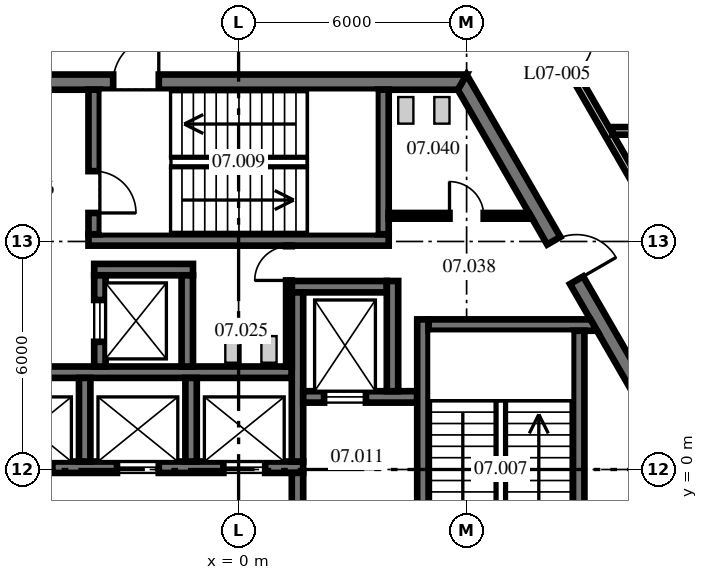
"""IFC4 building model, lengths in metres.
Left out: names, types, materials, properties, quantities, classifications, styles, units other than length and angle.
Written with IfcOpenShell. Run it as: python <this file> out.ifc"""

import sys

from ifc_helpers import new_model, si_unit, direction, frame, frame_2d, origin, place, context, subcontext, project, spatial, polyline, rectangle, outline, extrude, source, transform, mapped, element, fill, save


model = new_model("IFC4")
c1 = context("Model", 3, precision=1e-05, world=origin(), true_north=direction((0.0, 1.0)))
c2 = subcontext(c1, "Body", "Model", "MODEL_VIEW")
j1 = project(units=[si_unit("LENGTHUNIT", "METRE"), si_unit("PLANEANGLEUNIT", "RADIAN")], contexts=[c1])
p1 = place(None, origin())
s1 = spatial("IfcSite", under=j1, at=p1, CompositionType="ELEMENT")
p2 = place(p1, origin())
s2 = spatial("IfcBuilding", under=s1, at=p2, CompositionType="ELEMENT")
p3 = place(p2, frame((0.0, 0.0, 33.2)))
s3 = spatial("IfcBuildingStorey", under=s2, at=p3, CompositionType="ELEMENT", Elevation=33.2)
m1 = source(origin(), c2, "Body", "SweptSolid", [
    extrude(outline(polyline([(-0.115, -0.2), (11.885, -0.2), (11.654, 0.2), (0.115, 0.2), (-0.115, -0.2)])), origin(), (0.0, 0.0, 1.0), 4.1),
])
p4 = place(p3, frame((11.769, 0.0, 0.0), z_axis=(0.0, 0.0, 1.0), x_axis=(-0.499996592174, 0.866027371285, 0.0)))
e1 = element("IfcWall", 1, at=p4, inside=s3, PredefinedType="SHEAR", context=c2, shape_type="MappedRepresentation", body=[
    mapped(m1, transform((0.0, 0.0, 0.0), scale=1.0)),
])
p5 = place(p4, frame((5.75, 0.0, 0.0)))
e2 = element("IfcOpeningElement", 2, at=p5, cuts=e1, PredefinedType="OPENING", context=c2, shape_type="SweptSolid", body=[
    extrude(rectangle(XDim=1.2, YDim=2.1, at=frame_2d((0.6, 1.05))), frame((0.0, 0.21, 0.0), z_axis=(0.0, -1.0, 0.0), x_axis=(1.0, 0.0, 0.0)), (0.0, 0.0, 1.0), 0.42),
])
p6 = place(p3, frame((5.885, 10.192, 0.0), z_axis=(0.0, 0.0, 1.0), x_axis=(-1.0, 0.0, 0.0)))
e3 = element("IfcWall", 3, at=p6, inside=s3, PredefinedType="SHEAR", context=c2, shape_type="MappedRepresentation", body=[
    mapped(m1, transform((0.0, 0.0, 0.0), scale=1.0)),
])
p7 = place(p6, frame((7.985, 0.0, 0.0)))
e4 = element("IfcOpeningElement", 4, at=p7, cuts=e3, PredefinedType="OPENING", context=c2, shape_type="SweptSolid", body=[
    extrude(rectangle(XDim=1.2, YDim=2.1, at=frame_2d((0.6, 1.05))), frame((0.0, 0.21, 0.0), z_axis=(0.0, -1.0, 0.0), x_axis=(1.0, 0.0, 0.0)), (0.0, 0.0, 1.0), 0.42),
])
p8 = place(p3, frame((5.885, -10.192, 0.0), z_axis=(0.0, 0.0, 1.0), x_axis=(0.499996592174, 0.866027371285, 0.0)))
e5 = element("IfcWall", 5, at=p8, inside=s3, PredefinedType="SHEAR", context=c2, shape_type="MappedRepresentation", body=[
    mapped(m1, transform((0.0, 0.0, 0.0), scale=1.0)),
])
p9 = place(p8, frame((3.665, 0.0, 0.0)))
e6 = element("IfcOpeningElement", 6, at=p9, cuts=e5, PredefinedType="OPENING", context=c2, shape_type="SweptSolid", body=[
    extrude(rectangle(XDim=1.2, YDim=2.1, at=frame_2d((0.6, 1.05))), frame((0.0, 0.21, 0.0), z_axis=(0.0, -1.0, 0.0), x_axis=(1.0, 0.0, 0.0)), (0.0, 0.0, 1.0), 0.42),
])
m2 = source(origin(), c2, "Body", "SweptSolid", [
    extrude(rectangle(XDim=11.5, YDim=0.3, at=frame_2d((5.75, 0.0))), origin(), (0.0, 0.0, 1.0), 4.1),
])
p10 = place(p3, frame((-9.8, 0.06, 0.0), z_axis=(0.0, 0.0, 1.0), x_axis=(1.0, 0.0, 0.0)))
e7 = element("IfcWall", 7, at=p10, inside=s3, PredefinedType="SHEAR", context=c2, shape_type="MappedRepresentation", body=[
    mapped(m2, transform((0.0, 0.0, 0.0), scale=1.0)),
])
p11 = place(p10, frame((1.0, 0.0, 0.0)))
e8 = element("IfcOpeningElement", 8, at=p11, cuts=e7, PredefinedType="OPENING", context=c2, shape_type="SweptSolid", body=[
    extrude(rectangle(XDim=1.1, YDim=2.1, at=frame_2d((0.55, 1.05))), frame((0.0, 0.16, 0.0), z_axis=(0.0, -1.0, 0.0), x_axis=(1.0, 0.0, 0.0)), (0.0, 0.0, 1.0), 0.32),
])
p12 = place(p10, frame((3.8, 0.0, 0.0)))
e9 = element("IfcOpeningElement", 9, at=p12, cuts=e7, PredefinedType="OPENING", context=c2, shape_type="SweptSolid", body=[
    extrude(rectangle(XDim=1.1, YDim=2.1, at=frame_2d((0.55, 1.05))), frame((0.0, 0.16, 0.0), z_axis=(0.0, -1.0, 0.0), x_axis=(1.0, 0.0, 0.0)), (0.0, 0.0, 1.0), 0.32),
])
p13 = place(p10, frame((6.6, 0.0, 0.0)))
e10 = element("IfcOpeningElement", 10, at=p13, cuts=e7, PredefinedType="OPENING", context=c2, shape_type="SweptSolid", body=[
    extrude(rectangle(XDim=1.1, YDim=2.1, at=frame_2d((0.55, 1.05))), frame((0.0, 0.16, 0.0), z_axis=(0.0, -1.0, 0.0), x_axis=(1.0, 0.0, 0.0)), (0.0, 0.0, 1.0), 0.32),
])
p14 = place(p10, frame((9.4, 0.0, 0.0)))
e11 = element("IfcOpeningElement", 11, at=p14, cuts=e7, PredefinedType="OPENING", context=c2, shape_type="SweptSolid", body=[
    extrude(rectangle(XDim=1.1, YDim=2.1, at=frame_2d((0.55, 1.05))), frame((0.0, 0.16, 0.0), z_axis=(0.0, -1.0, 0.0), x_axis=(1.0, 0.0, 0.0)), (0.0, 0.0, 1.0), 0.32),
])
m3 = source(origin(), c2, "Body", "SweptSolid", [
    extrude(outline(polyline([(11.2, -0.15), (-0.349, -0.15), (-0.176, 0.15), (11.2, 0.15), (11.2, -0.15)])), origin(), (0.0, 0.0, 1.0), 4.1),
])
p15 = place(p3, frame((-9.8, 2.56, 0.0), z_axis=(0.0, 0.0, 1.0), x_axis=(1.0, 0.0, 0.0)))
e12 = element("IfcWall", 12, at=p15, inside=s3, PredefinedType="SHEAR", context=c2, shape_type="MappedRepresentation", body=[
    mapped(m3, transform((0.0, 0.0, 0.0), scale=1.0)),
])
m4 = source(origin(), c2, "Body", "SweptSolid", [
    extrude(rectangle(XDim=2.5, YDim=0.3, at=frame_2d((1.25, 0.0))), origin(), (0.0, 0.0, 1.0), 4.1),
])
p16 = place(p3, frame((1.4, 4.81, 0.0), z_axis=(0.0, 0.0, 1.0), x_axis=(1.0, 0.0, 0.0)))
e13 = element("IfcWall", 13, at=p16, inside=s3, PredefinedType="SHEAR", context=c2, shape_type="MappedRepresentation", body=[
    mapped(m4, transform((0.0, 0.0, 0.0), scale=1.0)),
])
m5 = source(origin(), c2, "Body", "SweptSolid", [
    extrude(rectangle(XDim=4.45, YDim=0.3, at=frame_2d((2.225, 0.0))), origin(), (0.0, 0.0, 1.0), 4.1),
])
p17 = place(p3, frame((1.55, 0.21, 0.0), z_axis=(0.0, 0.0, 1.0), x_axis=(0.0, 1.0, 0.0)))
e14 = element("IfcWall", 14, at=p17, inside=s3, PredefinedType="SHEAR", context=c2, shape_type="MappedRepresentation", body=[
    mapped(m5, transform((0.0, 0.0, 0.0), scale=1.0)),
])
m6 = source(origin(), c2, "Body", "SweptSolid", [
    extrude(rectangle(XDim=3.0, YDim=0.3, at=frame_2d((1.5, 0.0))), origin(), (0.0, 0.0, 1.0), 4.1),
])
p18 = place(p3, frame((1.7, 1.91, 0.0), z_axis=(0.0, 0.0, 1.0), x_axis=(1.0, 0.0, 0.0)))
e15 = element("IfcWall", 15, at=p18, inside=s3, PredefinedType="SHEAR", context=c2, shape_type="MappedRepresentation", body=[
    mapped(m6, transform((0.0, 0.0, 0.0), scale=1.0)),
])
p19 = place(p18, frame((0.55, 0.0, 0.0)))
e16 = element("IfcOpeningElement", 16, at=p19, cuts=e15, PredefinedType="OPENING", context=c2, shape_type="SweptSolid", body=[
    extrude(rectangle(XDim=1.1, YDim=2.1, at=frame_2d((0.55, 1.05))), frame((0.0, 0.16, 0.0), z_axis=(0.0, -1.0, 0.0), x_axis=(1.0, 0.0, 0.0)), (0.0, 0.0, 1.0), 0.32),
])
m7 = source(origin(), c2, "Body", "SweptSolid", [
    extrude(rectangle(XDim=2.9, YDim=0.3, at=frame_2d((1.45, 0.0))), origin(), (0.0, 0.0, 1.0), 4.1),
])
p20 = place(p3, frame((4.05, 2.06, 0.0), z_axis=(0.0, 0.0, 1.0), x_axis=(0.0, 1.0, 0.0)))
e17 = element("IfcWall", 17, at=p20, inside=s3, PredefinedType="SHEAR", context=c2, shape_type="MappedRepresentation", body=[
    mapped(m7, transform((0.0, 0.0, 0.0), scale=1.0)),
])
p21 = place(p3, frame((1.55, -3.09, 0.0), z_axis=(0.0, 0.0, 1.0), x_axis=(0.0, 1.0, 0.0)))
e18 = element("IfcWall", 18, at=p21, inside=s3, PredefinedType="SHEAR", context=c2, shape_type="MappedRepresentation", body=[
    mapped(m6, transform((0.0, 0.0, 0.0), scale=1.0)),
])
p22 = place(p21, frame((0.9, 0.0, 0.0)))
e19 = element("IfcOpeningElement", 19, at=p22, cuts=e18, PredefinedType="OPENING", context=c2, shape_type="SweptSolid", body=[
    extrude(rectangle(XDim=1.2, YDim=2.1, at=frame_2d((0.6, 1.05))), frame((0.0, 0.16, 0.0), z_axis=(0.0, -1.0, 0.0), x_axis=(1.0, 0.0, 0.0)), (0.0, 0.0, 1.0), 0.32),
])
m8 = source(origin(), c2, "Body", "SweptSolid", [
    extrude(outline(polyline([(-0.15, -0.15), (9.99, -0.15), (9.99, 0.15), (0.15, 0.15), (-0.15, -0.15)])), origin(), (0.0, 0.0, 1.0), 4.1),
])
p23 = place(p3, frame((4.85, -6.04, 0.0), z_axis=(0.0, 0.0, 1.0), x_axis=(0.0, 1.0, 0.0)))
e20 = element("IfcWall", 20, at=p23, inside=s3, PredefinedType="SHEAR", context=c2, shape_type="MappedRepresentation", body=[
    mapped(m8, transform((0.0, 0.0, 0.0), scale=1.0)),
])
p24 = place(p23, frame((3.19, 0.0, 0.0)))
e21 = element("IfcOpeningElement", 21, at=p24, cuts=e20, PredefinedType="OPENING", context=c2, shape_type="SweptSolid", body=[
    extrude(rectangle(XDim=1.1, YDim=2.1, at=frame_2d((0.55, 1.05))), frame((0.0, 0.16, 0.0), z_axis=(0.0, -1.0, 0.0), x_axis=(1.0, 0.0, 0.0)), (0.0, 0.0, 1.0), 0.32),
])
m9 = source(origin(), c2, "Body", "SweptSolid", [
    extrude(outline(polyline([(0.0, -0.15), (0.0, 0.15), (4.26, 0.15), (4.433, -0.15), (0.0, -0.15)])), origin(), (0.0, 0.0, 1.0), 4.1),
])
p25 = place(p3, frame((5.0, 3.8, 0.0), z_axis=(0.0, 0.0, 1.0), x_axis=(1.0, 0.0, 0.0)))
e22 = element("IfcWall", 22, at=p25, inside=s3, PredefinedType="SHEAR", context=c2, shape_type="MappedRepresentation", body=[
    mapped(m9, transform((0.0, 0.0, 0.0), scale=1.0)),
])
m10 = source(origin(), c2, "Body", "SweptSolid", [
    extrude(rectangle(XDim=7.3, YDim=0.3, at=frame_2d((3.65, 0.0))), origin(), (0.0, 0.0, 1.0), 4.1),
])
p26 = place(p3, frame((8.95, -3.65, 0.0), z_axis=(0.0, 0.0, 1.0), x_axis=(0.0, 1.0, 0.0)))
e23 = element("IfcWall", 23, at=p26, inside=s3, PredefinedType="SHEAR", context=c2, shape_type="MappedRepresentation", body=[
    mapped(m10, transform((0.0, 0.0, 0.0), scale=1.0)),
])
m11 = source(origin(), c2, "Body", "SweptSolid", [
    extrude(rectangle(XDim=7.9, YDim=0.3, at=frame_2d((3.95, 0.0))), origin(), (0.0, 0.0, 1.0), 4.1),
])
p27 = place(p3, frame((-3.95, 6.04, 0.0), z_axis=(0.0, 0.0, 1.0), x_axis=(1.0, 0.0, 0.0)))
e24 = element("IfcWall", 24, at=p27, inside=s3, PredefinedType="SHEAR", context=c2, shape_type="MappedRepresentation", body=[
    mapped(m11, transform((0.0, 0.0, 0.0), scale=1.0)),
])
m12 = source(origin(), c2, "Body", "SweptSolid", [
    extrude(outline(polyline([(0.0, -0.15), (0.0, 0.15), (3.804, 0.15), (3.804, -0.15), (0.0, -0.15)])), origin(), (0.0, 0.0, 1.0), 4.1),
])
p28 = place(p3, frame((-3.8, 6.19, 0.0), z_axis=(0.0, 0.0, 1.0), x_axis=(0.0, 1.0, 0.0)))
e25 = element("IfcWall", 25, at=p28, inside=s3, PredefinedType="SHEAR", context=c2, shape_type="MappedRepresentation", body=[
    mapped(m12, transform((0.0, 0.0, 0.0), scale=1.0)),
])
p29 = place(p28, frame((0.56, 0.0, 0.0)))
e26 = element("IfcOpeningElement", 26, at=p29, cuts=e25, PredefinedType="OPENING", context=c2, shape_type="SweptSolid", body=[
    extrude(rectangle(XDim=1.1, YDim=2.1, at=frame_2d((0.55, 1.05))), frame((0.0, 0.16, 0.0), z_axis=(0.0, -1.0, 0.0), x_axis=(1.0, 0.0, 0.0)), (0.0, 0.0, 1.0), 0.32),
])
p30 = place(p3, frame((3.8, 6.19, 0.0), z_axis=(0.0, 0.0, 1.0), x_axis=(0.0, 1.0, 0.0)))
e27 = element("IfcWall", 27, at=p30, inside=s3, PredefinedType="SHEAR", context=c2, shape_type="MappedRepresentation", body=[
    mapped(m12, transform((0.0, 0.0, 0.0), scale=1.0)),
])
m13 = source(origin(), c2, "Body", "SweptSolid", [
    extrude(rectangle(XDim=2.6, YDim=0.3, at=frame_2d((1.3, 0.0))), origin(), (0.0, 0.0, 1.0), 4.1),
])
p31 = place(p3, frame((-3.8, 5.26, 0.0), z_axis=(0.0, 0.0, 1.0), x_axis=(1.0, 0.0, 0.0)))
e28 = element("IfcWall", 28, at=p31, inside=s3, PredefinedType="SHEAR", context=c2, shape_type="MappedRepresentation", body=[
    mapped(m13, transform((0.0, 0.0, 0.0), scale=1.0)),
])
m14 = source(origin(), c2, "Body", "SweptSolid", [
    extrude(rectangle(XDim=2.4, YDim=0.3, at=frame_2d((1.2, 0.0))), origin(), (0.0, 0.0, 1.0), 4.1),
])
p32 = place(p3, frame((-3.65, 2.71, 0.0), z_axis=(0.0, 0.0, 1.0), x_axis=(0.0, 1.0, 0.0)))
e29 = element("IfcWall", 29, at=p32, inside=s3, PredefinedType="SHEAR", context=c2, shape_type="MappedRepresentation", body=[
    mapped(m14, transform((0.0, 0.0, 0.0), scale=1.0)),
])
p33 = place(p32, frame((0.65, 0.0, 0.0)))
e30 = element("IfcOpeningElement", 30, at=p33, cuts=e29, PredefinedType="OPENING", context=c2, shape_type="SweptSolid", body=[
    extrude(rectangle(XDim=1.1, YDim=2.1, at=frame_2d((0.55, 1.05))), frame((0.0, 0.16, 0.0), z_axis=(0.0, -1.0, 0.0), x_axis=(1.0, 0.0, 0.0)), (0.0, 0.0, 1.0), 0.32),
])
p34 = place(p3, frame((-1.35, 2.71, 0.0), z_axis=(0.0, 0.0, 1.0), x_axis=(0.0, 1.0, 0.0)))
e31 = element("IfcWall", 31, at=p34, inside=s3, PredefinedType="SHEAR", context=c2, shape_type="MappedRepresentation", body=[
    mapped(m14, transform((0.0, 0.0, 0.0), scale=1.0)),
])
m15 = source(origin(), c2, "Body", "SweptSolid", [
    extrude(rectangle(XDim=3.18, YDim=0.15, at=frame_2d((1.59, 0.0))), origin(), (0.0, 0.0, 1.0), 4.1),
])
p35 = place(p3, frame((1.325, 2.71, 0.0), z_axis=(0.0, 0.0, 1.0), x_axis=(0.0, 1.0, 0.0)))
e32 = element("IfcWall", 32, at=p35, inside=s3, PredefinedType="PARTITIONING", context=c2, shape_type="MappedRepresentation", body=[
    mapped(m15, transform((0.0, 0.0, 0.0), scale=1.0)),
])
p36 = place(p35, frame((2.265, 0.0, 0.0)))
e33 = element("IfcOpeningElement", 33, at=p36, cuts=e32, PredefinedType="OPENING", context=c2, shape_type="SweptSolid", body=[
    extrude(rectangle(XDim=0.9, YDim=2.1, at=frame_2d((0.45, 1.05))), frame((0.0, 0.085, 0.0), z_axis=(0.0, -1.0, 0.0), x_axis=(1.0, 0.0, 0.0)), (0.0, 0.0, 1.0), 0.17),
])
m16 = source(origin(), c2, "Body", "SweptSolid", [
    extrude(outline(polyline([(0.0, -0.075), (0.0, 0.075), (3.693, 0.075), (3.78, -0.075), (0.0, -0.075)])), origin(), (0.0, 0.0, 1.0), 4.1),
])
p37 = place(p3, frame((3.95, 6.675, 0.0), z_axis=(0.0, 0.0, 1.0), x_axis=(1.0, 0.0, 0.0)))
e34 = element("IfcWall", 34, at=p37, inside=s3, PredefinedType="PARTITIONING", context=c2, shape_type="MappedRepresentation", body=[
    mapped(m16, transform((0.0, 0.0, 0.0), scale=1.0)),
])
p38 = place(p37, frame((1.6, 0.0, 0.0)))
e35 = element("IfcOpeningElement", 35, at=p38, cuts=e34, PredefinedType="OPENING", context=c2, shape_type="SweptSolid", body=[
    extrude(rectangle(XDim=0.9, YDim=2.1, at=frame_2d((0.45, 1.05))), frame((0.0, 0.085, 0.0), z_axis=(0.0, -1.0, 0.0), x_axis=(1.0, 0.0, 0.0)), (0.0, 0.0, 1.0), 0.17),
])
m17 = source(origin(), c2, "Body", "SweptSolid", [
    extrude(rectangle(XDim=2.2, YDim=0.3, at=frame_2d((1.1, 0.0))), origin(), (0.0, 0.0, 1.0), 4.1),
])
for number, where, z_axis, x_axis in (
    (36, (-4.05, 0.21, 0.0), (0.0, 0.0, 1.0), (0.0, 1.0, 0.0)),
    (37, (-1.25, 0.21, 0.0), (0.0, 0.0, 1.0), (0.0, 1.0, 0.0)),
):
    element("IfcWall", number, at=place(p3, frame(where, z_axis=z_axis, x_axis=x_axis)), inside=s3, PredefinedType="SHEAR", context=c2, shape_type="MappedRepresentation", body=[
        mapped(m17, transform((0.0, 0.0, 0.0), scale=1.0)),
    ])
m18 = source(origin(), c2, "Body", "SweptSolid", [
    extrude(rectangle(XDim=14.759, YDim=0.2, at=frame_2d((7.379, 0.0))), origin(), (0.0, 0.0, 1.0), 4.1),
])
p39 = place(p3, frame((7.449, 12.782, 0.0), z_axis=(0.0, 0.0, 1.0), x_axis=(0.500005012202, -0.866022509969, 0.0)))
e38 = element("IfcWall", 38, at=p39, inside=s3, PredefinedType="PARTITIONING", context=c2, shape_type="MappedRepresentation", body=[
    mapped(m18, transform((0.0, 0.0, 0.0), scale=1.0)),
])
p40 = place(p39, frame((9.109, 0.0, 0.0)))
e39 = element("IfcOpeningElement", 39, at=p40, cuts=e38, PredefinedType="OPENING", context=c2, shape_type="SweptSolid", body=[
    extrude(rectangle(XDim=1.0, YDim=2.1, at=frame_2d((0.5, 1.05))), frame((0.0, 0.11, 0.0), z_axis=(0.0, -1.0, 0.0), x_axis=(1.0, 0.0, 0.0)), (0.0, 0.0, 1.0), 0.22),
])
p41 = place(p39, frame((1.721, 0.0, 0.0)))
e40 = element("IfcOpeningElement", 40, at=p41, cuts=e38, PredefinedType="OPENING", context=c2, shape_type="SweptSolid", body=[
    extrude(rectangle(XDim=1.0, YDim=2.1, at=frame_2d((0.5, 1.05))), frame((0.0, 0.11, 0.0), z_axis=(0.0, -1.0, 0.0), x_axis=(1.0, 0.0, 0.0)), (0.0, 0.0, 1.0), 0.22),
])
m19 = source(origin(), c2, "Body", "SweptSolid", [
    extrude(rectangle(XDim=11.652, YDim=0.2, at=frame_2d((5.826, 0.0))), origin(), (0.0, 0.0, 1.0), 3.343),
])
p42 = place(p3, frame((9.835, 8.91, 0.0), z_axis=(0.0, 0.0, 1.0), x_axis=(1.0, 0.0, 0.0)))
e41 = element("IfcWall", 41, at=p42, inside=s3, PredefinedType="PARTITIONING", context=c2, shape_type="MappedRepresentation", body=[
    mapped(m19, transform((0.0, 0.0, 0.0), scale=1.0)),
])
p43 = place(p7, frame((1.2, 0.0, 0.0), z_axis=(0.0, 0.0, 1.0), x_axis=(-1.0, 0.0, 0.0)))
e42 = element("IfcDoor", 42, at=p43, inside=s3, OperationType="SINGLE_SWING_RIGHT", PredefinedType="DOOR", context=c2, shape_type="SweptSolid", body=[
    extrude(rectangle(XDim=1.2, YDim=2.1, at=frame_2d((0.6, 1.05))), frame((0.0, 0.025, 0.0), z_axis=(0.0, -1.0, 0.0), x_axis=(1.0, 0.0, 0.0)), (0.0, 0.0, 1.0), 0.05),
])
fill(e4, e42)
p44 = place(p5, frame((1.2, 0.0, 0.0), z_axis=(0.0, 0.0, 1.0), x_axis=(-1.0, 0.0, 0.0)))
e43 = element("IfcDoor", 43, at=p44, inside=s3, OperationType="SINGLE_SWING_RIGHT", PredefinedType="DOOR", context=c2, shape_type="SweptSolid", body=[
    extrude(rectangle(XDim=1.2, YDim=2.1, at=frame_2d((0.6, 1.05))), frame((0.0, 0.025, 0.0), z_axis=(0.0, -1.0, 0.0), x_axis=(1.0, 0.0, 0.0)), (0.0, 0.0, 1.0), 0.05),
])
fill(e2, e43)
p45 = place(p29, frame((1.1, 0.0, 0.0), z_axis=(0.0, 0.0, 1.0), x_axis=(-1.0, 0.0, 0.0)))
e44 = element("IfcDoor", 44, at=p45, inside=s3, OperationType="SINGLE_SWING_RIGHT", PredefinedType="DOOR", context=c2, shape_type="SweptSolid", body=[
    extrude(rectangle(XDim=1.1, YDim=2.1, at=frame_2d((0.55, 1.05))), frame((0.0, 0.025, 0.0), z_axis=(0.0, -1.0, 0.0), x_axis=(1.0, 0.0, 0.0)), (0.0, 0.0, 1.0), 0.05),
])
fill(e26, e44)
p46 = place(p36, origin())
e45 = element("IfcDoor", 45, at=p46, inside=s3, OperationType="SINGLE_SWING_LEFT", PredefinedType="DOOR", context=c2, shape_type="SweptSolid", body=[
    extrude(rectangle(XDim=0.9, YDim=2.1, at=frame_2d((0.45, 1.05))), frame((0.0, 0.025, 0.0), z_axis=(0.0, -1.0, 0.0), x_axis=(1.0, 0.0, 0.0)), (0.0, 0.0, 1.0), 0.05),
])
fill(e33, e45)
p47 = place(p38, origin())
e46 = element("IfcDoor", 46, at=p47, inside=s3, OperationType="SINGLE_SWING_LEFT", PredefinedType="DOOR", context=c2, shape_type="SweptSolid", body=[
    extrude(rectangle(XDim=0.9, YDim=2.1, at=frame_2d((0.45, 1.05))), frame((0.0, 0.025, 0.0), z_axis=(0.0, -1.0, 0.0), x_axis=(1.0, 0.0, 0.0)), (0.0, 0.0, 1.0), 0.05),
])
fill(e35, e46)
p48 = place(p13, origin())
e47 = element("IfcDoor", 47, at=p48, inside=s3, OperationType="DOUBLE_DOOR_SLIDING", PredefinedType="DOOR", context=c2, shape_type="SweptSolid", body=[
    extrude(rectangle(XDim=1.1, YDim=2.1, at=frame_2d((0.55, 1.05))), frame((0.0, 0.025, 0.0), z_axis=(0.0, -1.0, 0.0), x_axis=(1.0, 0.0, 0.0)), (0.0, 0.0, 1.0), 0.05),
])
fill(e10, e47)
p49 = place(p14, origin())
e48 = element("IfcDoor", 48, at=p49, inside=s3, OperationType="DOUBLE_DOOR_SLIDING", PredefinedType="DOOR", context=c2, shape_type="SweptSolid", body=[
    extrude(rectangle(XDim=1.1, YDim=2.1, at=frame_2d((0.55, 1.05))), frame((0.0, 0.025, 0.0), z_axis=(0.0, -1.0, 0.0), x_axis=(1.0, 0.0, 0.0)), (0.0, 0.0, 1.0), 0.05),
])
fill(e11, e48)
p50 = place(p19, origin())
e49 = element("IfcDoor", 49, at=p50, inside=s3, OperationType="DOUBLE_DOOR_SLIDING", PredefinedType="DOOR", context=c2, shape_type="SweptSolid", body=[
    extrude(rectangle(XDim=1.1, YDim=2.1, at=frame_2d((0.55, 1.05))), frame((0.0, 0.025, 0.0), z_axis=(0.0, -1.0, 0.0), x_axis=(1.0, 0.0, 0.0)), (0.0, 0.0, 1.0), 0.05),
])
fill(e16, e49)
p51 = place(p33, origin())
e50 = element("IfcDoor", 50, at=p51, inside=s3, OperationType="DOUBLE_DOOR_SLIDING", PredefinedType="DOOR", context=c2, shape_type="SweptSolid", body=[
    extrude(rectangle(XDim=1.1, YDim=2.1, at=frame_2d((0.55, 1.05))), frame((0.0, 0.025, 0.0), z_axis=(0.0, -1.0, 0.0), x_axis=(1.0, 0.0, 0.0)), (0.0, 0.0, 1.0), 0.05),
])
fill(e30, e50)
p52 = place(p41, origin())
e51 = element("IfcDoor", 51, at=p52, inside=s3, OperationType="SINGLE_SWING_LEFT", PredefinedType="DOOR", context=c2, shape_type="SweptSolid", body=[
    extrude(rectangle(XDim=1.0, YDim=2.1, at=frame_2d((0.5, 1.05))), frame((0.0, 0.025, 0.0), z_axis=(0.0, -1.0, 0.0), x_axis=(1.0, 0.0, 0.0)), (0.0, 0.0, 1.0), 0.05),
])
fill(e40, e51)
save(model, sys.argv[1])
